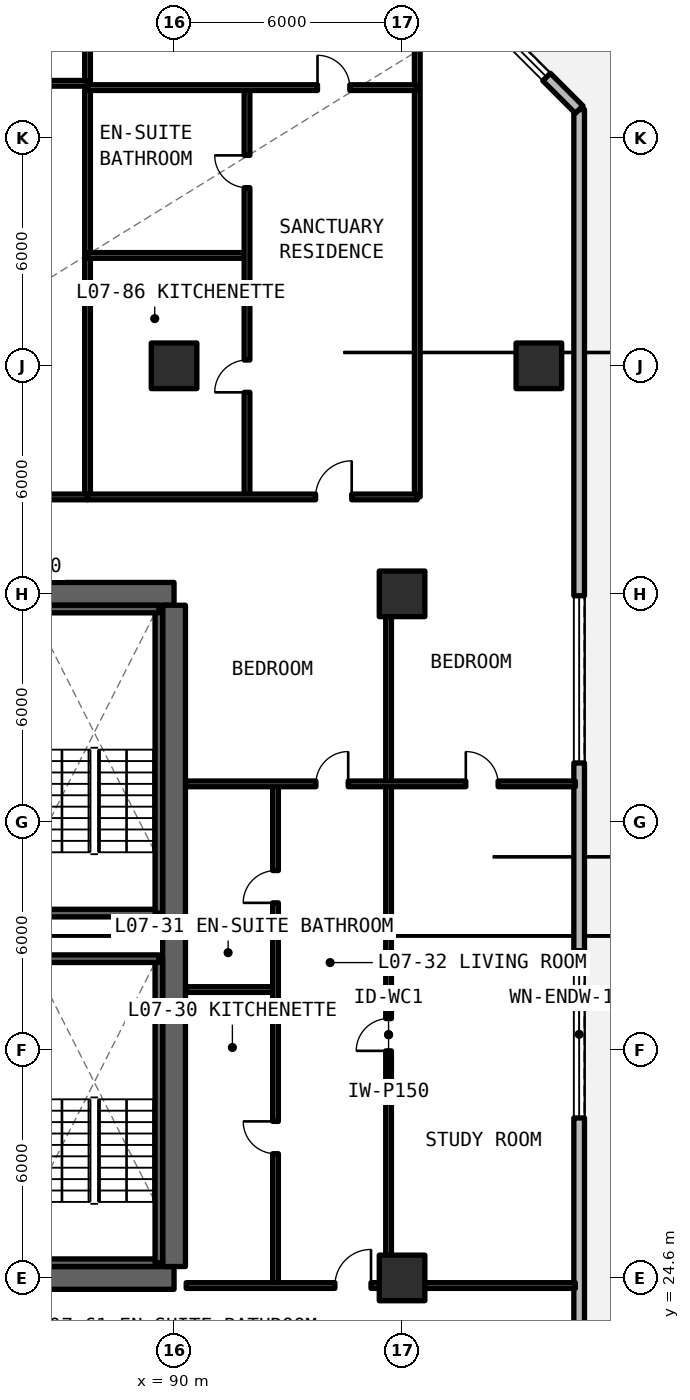
"""IFC4 building model, lengths in metres.
Left out: names, types, materials, properties, quantities, classifications, styles, units other than length and angle.
Written with IfcOpenShell. Run it as: python <this file> out.ifc"""

import sys

from ifc_helpers import new_model, si_unit, direction, frame, frame_2d, origin, origin_2d, place, context, subcontext, project, spatial, rectangle, extrude, element, fill, save


model = new_model("IFC4")
c1 = context("Model", 3, precision=1e-05, world=origin(), true_north=direction((0.0, 1.0)))
c2 = subcontext(c1, "Body", "Model", "MODEL_VIEW")
j1 = project(units=[si_unit("LENGTHUNIT", "METRE"), si_unit("PLANEANGLEUNIT", "RADIAN")], contexts=[c1])
p1 = place(None, origin())
s1 = spatial("IfcSite", under=j1, at=p1, CompositionType="ELEMENT")
p2 = place(p1, origin())
s2 = spatial("IfcBuilding", under=s1, at=p2, CompositionType="ELEMENT")
p3 = place(p2, frame((0.0, 0.0, 29.04)))
s3 = spatial("IfcBuildingStorey", under=s2, at=p3, CompositionType="ELEMENT", Elevation=29.04)
for number, where, z_axis, x_axis in (
    (1, (78.0, 24.6, 0.0), (0.0, 0.0, 1.0), (1.0, 0.0, 0.0)),
    (2, (90.0, 42.6, 0.0), (0.0, 0.0, 1.0), (-1.0, 0.0, 0.0)),
):
    element("IfcWall", number, at=place(p3, frame(where, z_axis=z_axis, x_axis=x_axis)), inside=s3, PredefinedType="SHEAR", context=c2, shape_type="SweptSolid", body=[
        extrude(rectangle(XDim=12.0, YDim=0.6, at=frame_2d((6.0, 0.0))), origin(), (0.0, 0.0, 1.0), 3.3),
    ])
p4 = place(p3, frame((90.0, 24.9, 0.0), z_axis=(0.0, 0.0, 1.0), x_axis=(0.0, 1.0, 0.0)))
e3 = element("IfcWall", 3, at=p4, inside=s3, PredefinedType="SHEAR", context=c2, shape_type="SweptSolid", body=[
    extrude(rectangle(XDim=17.4, YDim=0.6, at=frame_2d((8.7, 0.0))), origin(), (0.0, 0.0, 1.0), 3.3),
])
for number, where, z_axis, x_axis in (
    (4, (96.0, 24.6, -0.24), (0.0, 0.0, 1.0), (1.0, 0.0, 0.0)),
    (5, (96.0, 42.6, -0.24), (0.0, 0.0, 1.0), (1.0, 0.0, 0.0)),
):
    element("IfcColumn", number, at=place(p3, frame(where, z_axis=z_axis, x_axis=x_axis)), inside=s3, PredefinedType="COLUMN", context=c2, shape_type="SweptSolid", body=[
        extrude(rectangle(XDim=1.2, YDim=1.2, at=origin_2d()), origin(), (0.0, 0.0, 1.0), 3.54),
    ])
p5 = place(p3, frame((90.0, 48.6, 0.0), z_axis=(0.0, 0.0, 1.0), x_axis=(1.0, 0.0, 0.0)))
e6 = element("IfcColumn", 6, at=p5, inside=s3, PredefinedType="COLUMN", context=c2, shape_type="SweptSolid", body=[
    extrude(rectangle(XDim=1.2, YDim=1.2, at=origin_2d()), origin(), (0.0, 0.0, 1.0), 3.3),
])
p6 = place(p3, frame((99.6, 48.6, -0.24), z_axis=(0.0, 0.0, 1.0), x_axis=(1.0, 0.0, 0.0)))
e7 = element("IfcColumn", 7, at=p6, inside=s3, PredefinedType="COLUMN", context=c2, shape_type="SweptSolid", body=[
    extrude(rectangle(XDim=1.2, YDim=1.2, at=origin_2d()), origin(), (0.0, 0.0, 1.0), 3.54),
])
p7 = place(p3, frame((100.66, 11.858, 0.0), z_axis=(0.0, 0.0, 1.0), x_axis=(0.0, 1.0, 0.0)))
e8 = element("IfcWall", 8, at=p7, inside=s3, PredefinedType="SOLIDWALL", context=c2, shape_type="SweptSolid", body=[
    extrude(rectangle(XDim=43.484, YDim=0.28, at=frame_2d((21.742, 0.0))), origin(), (0.0, 0.0, 1.0), 3.08),
])
p8 = place(p7, frame((16.952, 0.0, 0.78)))
e9 = element("IfcOpeningElement", 9, at=p8, cuts=e8, PredefinedType="OPENING", context=c2, shape_type="SweptSolid", body=[
    extrude(rectangle(XDim=4.4, YDim=1.66, at=frame_2d((2.2, 0.83))), frame((0.0, 0.15, 0.0), z_axis=(0.0, -1.0, 0.0), x_axis=(1.0, 0.0, 0.0)), (0.0, 0.0, 1.0), 0.3),
])
p9 = place(p7, frame((26.292, 0.0, 0.78)))
e10 = element("IfcOpeningElement", 10, at=p9, cuts=e8, PredefinedType="OPENING", context=c2, shape_type="SweptSolid", body=[
    extrude(rectangle(XDim=4.4, YDim=1.66, at=frame_2d((2.2, 0.83))), frame((0.0, 0.15, 0.0), z_axis=(0.0, -1.0, 0.0), x_axis=(1.0, 0.0, 0.0)), (0.0, 0.0, 1.0), 0.3),
])
p10 = place(p7, frame((1.511, 0.0, 0.78)))
e11 = element("IfcOpeningElement", 11, at=p10, cuts=e8, PredefinedType="OPENING", context=c2, shape_type="SweptSolid", body=[
    extrude(rectangle(XDim=4.4, YDim=1.66, at=frame_2d((2.2, 0.83))), frame((0.0, 0.15, 0.0), z_axis=(0.0, -1.0, 0.0), x_axis=(1.0, 0.0, 0.0)), (0.0, 0.0, 1.0), 0.3),
])
p11 = place(p3, frame((100.66, 55.342, 0.0), z_axis=(0.0, 0.0, 1.0), x_axis=(-0.707106781187, 0.707106781187, 0.0)))
e12 = element("IfcWall", 12, at=p11, inside=s3, PredefinedType="SOLIDWALL", context=c2, shape_type="SweptSolid", body=[
    extrude(rectangle(XDim=5.824, YDim=0.28, at=frame_2d((2.912, 0.0))), origin(), (0.0, 0.0, 1.0), 3.08),
])
p12 = place(p11, frame((1.212, 0.0, 0.78)))
e13 = element("IfcOpeningElement", 13, at=p12, cuts=e12, PredefinedType="OPENING", context=c2, shape_type="SweptSolid", body=[
    extrude(rectangle(XDim=3.4, YDim=1.66, at=frame_2d((1.7, 0.83))), frame((0.0, 0.15, 0.0), z_axis=(0.0, -1.0, 0.0), x_axis=(1.0, 0.0, 0.0)), (0.0, 0.0, 1.0), 0.3),
])
p13 = place(p3, frame((95.645, 24.4, 0.0), z_axis=(0.0, 0.0, 1.0), x_axis=(0.0, 1.0, 0.0)))
e14 = element("IfcWall", 14, at=p13, inside=s3, PredefinedType="PARTITIONING", context=c2, shape_type="SweptSolid", body=[
    extrude(rectangle(XDim=13.2, YDim=0.15, at=frame_2d((6.6, 0.0))), origin(), (0.0, 0.0, 1.0), 2.35),
])
p14 = place(p13, frame((6.175, 0.0, 0.0)))
e15 = element("IfcOpeningElement", 15, at=p14, cuts=e14, PredefinedType="OPENING", context=c2, shape_type="SweptSolid", body=[
    extrude(rectangle(XDim=0.85, YDim=2.1, at=frame_2d((0.425, 1.05))), frame((0.0, 0.085, 0.0), z_axis=(0.0, -1.0, 0.0), x_axis=(1.0, 0.0, 0.0)), (0.0, 0.0, 1.0), 0.17),
])
p15 = place(p3, frame((90.32, 32.188, 0.0), z_axis=(0.0, 0.0, 1.0), x_axis=(1.0, 0.0, 0.0)))
e16 = element("IfcWall", 16, at=p15, inside=s3, PredefinedType="PARTITIONING", context=c2, shape_type="SweptSolid", body=[
    extrude(rectangle(XDim=2.35, YDim=0.15, at=frame_2d((1.175, 0.0))), origin(), (0.0, 0.0, 1.0), 2.35),
])
p16 = place(p3, frame((92.67, 24.4, 0.0), z_axis=(0.0, 0.0, 1.0), x_axis=(0.0, 1.0, 0.0)))
e17 = element("IfcWall", 17, at=p16, inside=s3, PredefinedType="PARTITIONING", context=c2, shape_type="SweptSolid", body=[
    extrude(rectangle(XDim=13.2, YDim=0.15, at=frame_2d((6.6, 0.0))), origin(), (0.0, 0.0, 1.0), 2.35),
])
p17 = place(p16, frame((3.469, 0.0, 0.0)))
e18 = element("IfcOpeningElement", 18, at=p17, cuts=e17, PredefinedType="OPENING", context=c2, shape_type="SweptSolid", body=[
    extrude(rectangle(XDim=0.85, YDim=2.1, at=frame_2d((0.425, 1.05))), frame((0.0, 0.085, 0.0), z_axis=(0.0, -1.0, 0.0), x_axis=(1.0, 0.0, 0.0)), (0.0, 0.0, 1.0), 0.17),
])
p18 = place(p16, frame((10.069, 0.0, 0.0)))
e19 = element("IfcOpeningElement", 19, at=p18, cuts=e17, PredefinedType="OPENING", context=c2, shape_type="SweptSolid", body=[
    extrude(rectangle(XDim=0.85, YDim=2.1, at=frame_2d((0.425, 1.05))), frame((0.0, 0.085, 0.0), z_axis=(0.0, -1.0, 0.0), x_axis=(1.0, 0.0, 0.0)), (0.0, 0.0, 1.0), 0.17),
])
p19 = place(p3, frame((95.645, 37.6, 0.0), z_axis=(0.0, 0.0, 1.0), x_axis=(0.0, 1.0, 0.0)))
e20 = element("IfcWall", 20, at=p19, inside=s3, PredefinedType="PARTITIONING", context=c2, shape_type="SweptSolid", body=[
    extrude(rectangle(XDim=5.2, YDim=0.15, at=frame_2d((2.6, 0.0))), origin(), (0.0, 0.0, 1.0), 2.35),
])
p20 = place(p3, frame((90.32, 37.6, 0.0), z_axis=(0.0, 0.0, 1.0), x_axis=(1.0, 0.0, 0.0)))
e21 = element("IfcWall", 21, at=p20, inside=s3, PredefinedType="PARTITIONING", context=c2, shape_type="SweptSolid", body=[
    extrude(rectangle(XDim=10.24, YDim=0.15, at=frame_2d((5.12, 0.0))), origin(), (0.0, 0.0, 1.0), 2.35),
])
p21 = place(p20, frame((3.412, 0.0, 0.0)))
e22 = element("IfcOpeningElement", 22, at=p21, cuts=e21, PredefinedType="OPENING", context=c2, shape_type="SweptSolid", body=[
    extrude(rectangle(XDim=0.85, YDim=2.1, at=frame_2d((0.425, 1.05))), frame((0.0, 0.085, 0.0), z_axis=(0.0, -1.0, 0.0), x_axis=(1.0, 0.0, 0.0)), (0.0, 0.0, 1.0), 0.17),
])
p22 = place(p20, frame((7.357, 0.0, 0.0)))
e23 = element("IfcOpeningElement", 23, at=p22, cuts=e21, PredefinedType="OPENING", context=c2, shape_type="SweptSolid", body=[
    extrude(rectangle(XDim=0.85, YDim=2.1, at=frame_2d((0.425, 1.05))), frame((0.0, 0.085, 0.0), z_axis=(0.0, -1.0, 0.0), x_axis=(1.0, 0.0, 0.0)), (0.0, 0.0, 1.0), 0.17),
])
p23 = place(p3, frame((90.32, 24.4, 0.0), z_axis=(0.0, 0.0, 1.0), x_axis=(1.0, 0.0, 0.0)))
e24 = element("IfcWall", 24, at=p23, inside=s3, PredefinedType="SOLIDWALL", context=c2, shape_type="SweptSolid", body=[
    extrude(rectangle(XDim=10.24, YDim=0.15, at=frame_2d((5.12, 0.0))), origin(), (0.0, 0.0, 1.0), 2.295),
])
p24 = place(p23, frame((3.913, 0.0, 0.0)))
e25 = element("IfcOpeningElement", 25, at=p24, cuts=e24, PredefinedType="OPENING", context=c2, shape_type="SweptSolid", body=[
    extrude(rectangle(XDim=0.95, YDim=2.15, at=frame_2d((0.475, 1.075))), frame((0.0, 0.085, 0.0), z_axis=(0.0, -1.0, 0.0), x_axis=(1.0, 0.0, 0.0)), (0.0, 0.0, 1.0), 0.17),
])
for number, where, z_axis, x_axis in (
    (26, (96.4, 45.15, 0.0), (0.0, 0.0, 1.0), (0.0, 1.0, 0.0)),
    (27, (87.724, 45.15, 0.0), (0.0, 0.0, 1.0), (0.0, 1.0, 0.0)),
):
    element("IfcWall", number, at=place(p3, frame(where, z_axis=z_axis, x_axis=x_axis)), inside=s3, PredefinedType="SOLIDWALL", context=c2, shape_type="SweptSolid", body=[
        extrude(rectangle(XDim=14.17, YDim=0.15, at=frame_2d((7.085, 0.0))), origin(), (0.0, 0.0, 1.0), 2.35),
    ])
p25 = place(p3, frame((78.748, 56.033, 0.0), z_axis=(0.0, 0.0, 1.0), x_axis=(1.0, 0.0, 0.0)))
e28 = element("IfcWall", 28, at=p25, inside=s3, PredefinedType="PARTITIONING", context=c2, shape_type="SweptSolid", body=[
    extrude(rectangle(XDim=8.976, YDim=0.15, at=frame_2d((4.488, 0.0))), origin(), (0.0, 0.0, 1.0), 2.35),
])
p26 = place(p25, frame((5.278, 0.0, 0.0)))
e29 = element("IfcOpeningElement", 29, at=p26, cuts=e28, PredefinedType="OPENING", context=c2, shape_type="SweptSolid", body=[
    extrude(rectangle(XDim=0.85, YDim=2.1, at=frame_2d((0.425, 1.05))), frame((0.0, 0.085, 0.0), z_axis=(0.0, -1.0, 0.0), x_axis=(1.0, 0.0, 0.0)), (0.0, 0.0, 1.0), 0.17),
])
p27 = place(p3, frame((78.748, 45.15, 0.0), z_axis=(0.0, 0.0, 1.0), x_axis=(1.0, 0.0, 0.0)))
e30 = element("IfcWall", 30, at=p27, inside=s3, PredefinedType="SOLIDWALL", context=c2, shape_type="SweptSolid", body=[
    extrude(rectangle(XDim=8.976, YDim=0.15, at=frame_2d((4.488, 0.0))), origin(), (0.0, 0.0, 1.0), 2.35),
])
p28 = place(p27, frame((5.228, 0.0, 0.0)))
e31 = element("IfcOpeningElement", 31, at=p28, cuts=e30, PredefinedType="OPENING", context=c2, shape_type="SweptSolid", body=[
    extrude(rectangle(XDim=0.95, YDim=2.15, at=frame_2d((0.475, 1.075))), frame((0.0, 0.085, 0.0), z_axis=(0.0, -1.0, 0.0), x_axis=(1.0, 0.0, 0.0)), (0.0, 0.0, 1.0), 0.17),
])
p29 = place(p3, frame((87.724, 51.504, 0.0), z_axis=(0.0, 0.0, 1.0), x_axis=(1.0, 0.0, 0.0)))
e32 = element("IfcWall", 32, at=p29, inside=s3, PredefinedType="PARTITIONING", context=c2, shape_type="SweptSolid", body=[
    extrude(rectangle(XDim=4.196, YDim=0.15, at=frame_2d((2.098, 0.0))), origin(), (0.0, 0.0, 1.0), 2.35),
])
p30 = place(p3, frame((91.92, 45.15, 0.0), z_axis=(0.0, 0.0, 1.0), x_axis=(0.0, 1.0, 0.0)))
e33 = element("IfcWall", 33, at=p30, inside=s3, PredefinedType="PARTITIONING", context=c2, shape_type="SweptSolid", body=[
    extrude(rectangle(XDim=10.77, YDim=0.15, at=frame_2d((5.385, 0.0))), origin(), (0.0, 0.0, 1.0), 2.35),
])
p31 = place(p30, frame((2.752, 0.0, 0.0)))
e34 = element("IfcOpeningElement", 34, at=p31, cuts=e33, PredefinedType="OPENING", context=c2, shape_type="SweptSolid", body=[
    extrude(rectangle(XDim=0.85, YDim=2.1, at=frame_2d((0.425, 1.05))), frame((0.0, 0.085, 0.0), z_axis=(0.0, -1.0, 0.0), x_axis=(1.0, 0.0, 0.0)), (0.0, 0.0, 1.0), 0.17),
])
p32 = place(p30, frame((8.137, 0.0, 0.0)))
e35 = element("IfcOpeningElement", 35, at=p32, cuts=e33, PredefinedType="OPENING", context=c2, shape_type="SweptSolid", body=[
    extrude(rectangle(XDim=0.85, YDim=2.1, at=frame_2d((0.425, 1.05))), frame((0.0, 0.085, 0.0), z_axis=(0.0, -1.0, 0.0), x_axis=(1.0, 0.0, 0.0)), (0.0, 0.0, 1.0), 0.17),
])
p33 = place(p3, frame((87.724, 55.92, 0.0), z_axis=(0.0, 0.0, 1.0), x_axis=(1.0, 0.0, 0.0)))
e36 = element("IfcWall", 36, at=p33, inside=s3, PredefinedType="PARTITIONING", context=c2, shape_type="SweptSolid", body=[
    extrude(rectangle(XDim=8.676, YDim=0.15, at=frame_2d((4.338, 0.0))), origin(), (0.0, 0.0, 1.0), 2.35),
])
p34 = place(p33, frame((6.052, 0.0, 0.0)))
e37 = element("IfcOpeningElement", 37, at=p34, cuts=e36, PredefinedType="OPENING", context=c2, shape_type="SweptSolid", body=[
    extrude(rectangle(XDim=0.85, YDim=2.1, at=frame_2d((0.425, 1.05))), frame((0.0, 0.085, 0.0), z_axis=(0.0, -1.0, 0.0), x_axis=(1.0, 0.0, 0.0)), (0.0, 0.0, 1.0), 0.17),
])
p35 = place(p3, frame((87.724, 45.15, 0.0), z_axis=(0.0, 0.0, 1.0), x_axis=(1.0, 0.0, 0.0)))
e38 = element("IfcWall", 38, at=p35, inside=s3, PredefinedType="SOLIDWALL", context=c2, shape_type="SweptSolid", body=[
    extrude(rectangle(XDim=8.676, YDim=0.15, at=frame_2d((4.338, 0.0))), origin(), (0.0, 0.0, 1.0), 2.35),
])
p36 = place(p35, frame((6.001, 0.0, 0.0)))
e39 = element("IfcOpeningElement", 39, at=p36, cuts=e38, PredefinedType="OPENING", context=c2, shape_type="SweptSolid", body=[
    extrude(rectangle(XDim=0.95, YDim=2.15, at=frame_2d((0.475, 1.075))), frame((0.0, 0.085, 0.0), z_axis=(0.0, -1.0, 0.0), x_axis=(1.0, 0.0, 0.0)), (0.0, 0.0, 1.0), 0.17),
])
p37 = place(p3, frame((86.2, 25.0, 0.0), z_axis=(0.0, 0.0, 1.0), x_axis=(1.0, 0.0, 0.0)))
e40 = element("IfcWall", 40, at=p37, inside=s3, PredefinedType="SOLIDWALL", context=c2, shape_type="SweptSolid", body=[
    extrude(rectangle(XDim=3.4, YDim=0.2, at=frame_2d((1.7, 0.0))), origin(), (0.0, 0.0, 1.0), 3.3),
])
p38 = place(p3, frame((89.6, 25.0, 0.0), z_axis=(0.0, 0.0, 1.0), x_axis=(0.0, 1.0, 0.0)))
e41 = element("IfcWall", 41, at=p38, inside=s3, PredefinedType="SOLIDWALL", context=c2, shape_type="SweptSolid", body=[
    extrude(rectangle(XDim=8.0, YDim=0.2, at=frame_2d((4.0, 0.0))), origin(), (0.0, 0.0, 1.0), 3.3),
])
for number, where, z_axis, x_axis in (
    (42, (89.6, 33.0, 0.0), (0.0, 0.0, 1.0), (-1.0, 0.0, 0.0)),
    (43, (86.2, 34.2, 0.0), (0.0, 0.0, 1.0), (1.0, 0.0, 0.0)),
):
    element("IfcWall", number, at=place(p3, frame(where, z_axis=z_axis, x_axis=x_axis)), inside=s3, PredefinedType="SOLIDWALL", context=c2, shape_type="SweptSolid", body=[
        extrude(rectangle(XDim=3.4, YDim=0.2, at=frame_2d((1.7, 0.0))), origin(), (0.0, 0.0, 1.0), 3.3),
    ])
p39 = place(p3, frame((89.6, 34.2, 0.0), z_axis=(0.0, 0.0, 1.0), x_axis=(0.0, 1.0, 0.0)))
e44 = element("IfcWall", 44, at=p39, inside=s3, PredefinedType="SOLIDWALL", context=c2, shape_type="SweptSolid", body=[
    extrude(rectangle(XDim=8.0, YDim=0.2, at=frame_2d((4.0, 0.0))), origin(), (0.0, 0.0, 1.0), 3.3),
])
p40 = place(p3, frame((89.6, 42.2, 0.0), z_axis=(0.0, 0.0, 1.0), x_axis=(-1.0, 0.0, 0.0)))
e45 = element("IfcWall", 45, at=p40, inside=s3, PredefinedType="SOLIDWALL", context=c2, shape_type="SweptSolid", body=[
    extrude(rectangle(XDim=3.4, YDim=0.2, at=frame_2d((1.7, 0.0))), origin(), (0.0, 0.0, 1.0), 3.3),
])
p41 = place(p8, origin())
e46 = element("IfcWindow", 46, at=p41, inside=s3, PartitioningType="SINGLE_PANEL", PredefinedType="WINDOW", context=c2, shape_type="SweptSolid", body=[
    extrude(rectangle(XDim=4.4, YDim=1.66, at=frame_2d((2.2, 0.83))), frame((0.0, 0.03, 0.0), z_axis=(0.0, -1.0, 0.0), x_axis=(1.0, 0.0, 0.0)), (0.0, 0.0, 1.0), 0.06),
])
fill(e9, e46)
p42 = place(p9, origin())
e47 = element("IfcWindow", 47, at=p42, inside=s3, PartitioningType="SINGLE_PANEL", PredefinedType="WINDOW", context=c2, shape_type="SweptSolid", body=[
    extrude(rectangle(XDim=4.4, YDim=1.66, at=frame_2d((2.2, 0.83))), frame((0.0, 0.03, 0.0), z_axis=(0.0, -1.0, 0.0), x_axis=(1.0, 0.0, 0.0)), (0.0, 0.0, 1.0), 0.06),
])
fill(e10, e47)
p43 = place(p12, origin())
e48 = element("IfcWindow", 48, at=p43, inside=s3, PartitioningType="SINGLE_PANEL", PredefinedType="WINDOW", context=c2, shape_type="SweptSolid", body=[
    extrude(rectangle(XDim=3.4, YDim=1.66, at=frame_2d((1.7, 0.83))), frame((0.0, 0.03, 0.0), z_axis=(0.0, -1.0, 0.0), x_axis=(1.0, 0.0, 0.0)), (0.0, 0.0, 1.0), 0.06),
])
fill(e13, e48)
p44 = place(p14, origin())
e49 = element("IfcDoor", 49, at=p44, inside=s3, OperationType="SINGLE_SWING_LEFT", PredefinedType="DOOR", context=c2, shape_type="SweptSolid", body=[
    extrude(rectangle(XDim=0.85, YDim=2.1, at=frame_2d((0.425, 1.05))), frame((0.0, 0.025, 0.0), z_axis=(0.0, -1.0, 0.0), x_axis=(1.0, 0.0, 0.0)), (0.0, 0.0, 1.0), 0.05),
])
fill(e15, e49)
p45 = place(p17, origin())
e50 = element("IfcDoor", 50, at=p45, inside=s3, OperationType="SINGLE_SWING_RIGHT", PredefinedType="DOOR", context=c2, shape_type="SweptSolid", body=[
    extrude(rectangle(XDim=0.85, YDim=2.1, at=frame_2d((0.425, 1.05))), frame((0.0, 0.025, 0.0), z_axis=(0.0, -1.0, 0.0), x_axis=(1.0, 0.0, 0.0)), (0.0, 0.0, 1.0), 0.05),
])
fill(e18, e50)
p46 = place(p18, origin())
e51 = element("IfcDoor", 51, at=p46, inside=s3, OperationType="SINGLE_SWING_LEFT", PredefinedType="DOOR", context=c2, shape_type="SweptSolid", body=[
    extrude(rectangle(XDim=0.85, YDim=2.1, at=frame_2d((0.425, 1.05))), frame((0.0, 0.025, 0.0), z_axis=(0.0, -1.0, 0.0), x_axis=(1.0, 0.0, 0.0)), (0.0, 0.0, 1.0), 0.05),
])
fill(e19, e51)
p47 = place(p21, origin())
e52 = element("IfcDoor", 52, at=p47, inside=s3, OperationType="SINGLE_SWING_RIGHT", PredefinedType="DOOR", context=c2, shape_type="SweptSolid", body=[
    extrude(rectangle(XDim=0.85, YDim=2.1, at=frame_2d((0.425, 1.05))), frame((0.0, 0.025, 0.0), z_axis=(0.0, -1.0, 0.0), x_axis=(1.0, 0.0, 0.0)), (0.0, 0.0, 1.0), 0.05),
])
fill(e22, e52)
p48 = place(p22, origin())
e53 = element("IfcDoor", 53, at=p48, inside=s3, OperationType="SINGLE_SWING_LEFT", PredefinedType="DOOR", context=c2, shape_type="SweptSolid", body=[
    extrude(rectangle(XDim=0.85, YDim=2.1, at=frame_2d((0.425, 1.05))), frame((0.0, 0.025, 0.0), z_axis=(0.0, -1.0, 0.0), x_axis=(1.0, 0.0, 0.0)), (0.0, 0.0, 1.0), 0.05),
])
fill(e23, e53)
p49 = place(p24, origin())
e54 = element("IfcDoor", 54, at=p49, inside=s3, OperationType="SINGLE_SWING_RIGHT", PredefinedType="DOOR", context=c2, shape_type="SweptSolid", body=[
    extrude(rectangle(XDim=0.95, YDim=2.15, at=frame_2d((0.475, 1.075))), frame((0.0, 0.025, 0.0), z_axis=(0.0, -1.0, 0.0), x_axis=(1.0, 0.0, 0.0)), (0.0, 0.0, 1.0), 0.05),
])
fill(e25, e54)
p50 = place(p31, origin())
e55 = element("IfcDoor", 55, at=p50, inside=s3, OperationType="SINGLE_SWING_LEFT", PredefinedType="DOOR", context=c2, shape_type="SweptSolid", body=[
    extrude(rectangle(XDim=0.85, YDim=2.1, at=frame_2d((0.425, 1.05))), frame((0.0, 0.025, 0.0), z_axis=(0.0, -1.0, 0.0), x_axis=(1.0, 0.0, 0.0)), (0.0, 0.0, 1.0), 0.05),
])
fill(e34, e55)
p51 = place(p32, origin())
e56 = element("IfcDoor", 56, at=p51, inside=s3, OperationType="SINGLE_SWING_RIGHT", PredefinedType="DOOR", context=c2, shape_type="SweptSolid", body=[
    extrude(rectangle(XDim=0.85, YDim=2.1, at=frame_2d((0.425, 1.05))), frame((0.0, 0.025, 0.0), z_axis=(0.0, -1.0, 0.0), x_axis=(1.0, 0.0, 0.0)), (0.0, 0.0, 1.0), 0.05),
])
fill(e35, e56)
p52 = place(p34, origin())
e57 = element("IfcDoor", 57, at=p52, inside=s3, OperationType="SINGLE_SWING_LEFT", PredefinedType="DOOR", context=c2, shape_type="SweptSolid", body=[
    extrude(rectangle(XDim=0.85, YDim=2.1, at=frame_2d((0.425, 1.05))), frame((0.0, 0.025, 0.0), z_axis=(0.0, -1.0, 0.0), x_axis=(1.0, 0.0, 0.0)), (0.0, 0.0, 1.0), 0.05),
])
fill(e37, e57)
p53 = place(p36, origin())
e58 = element("IfcDoor", 58, at=p53, inside=s3, OperationType="SINGLE_SWING_RIGHT", PredefinedType="DOOR", context=c2, shape_type="SweptSolid", body=[
    extrude(rectangle(XDim=0.95, YDim=2.15, at=frame_2d((0.475, 1.075))), frame((0.0, 0.025, 0.0), z_axis=(0.0, -1.0, 0.0), x_axis=(1.0, 0.0, 0.0)), (0.0, 0.0, 1.0), 0.05),
])
fill(e39, e58)
save(model, sys.argv[1])
